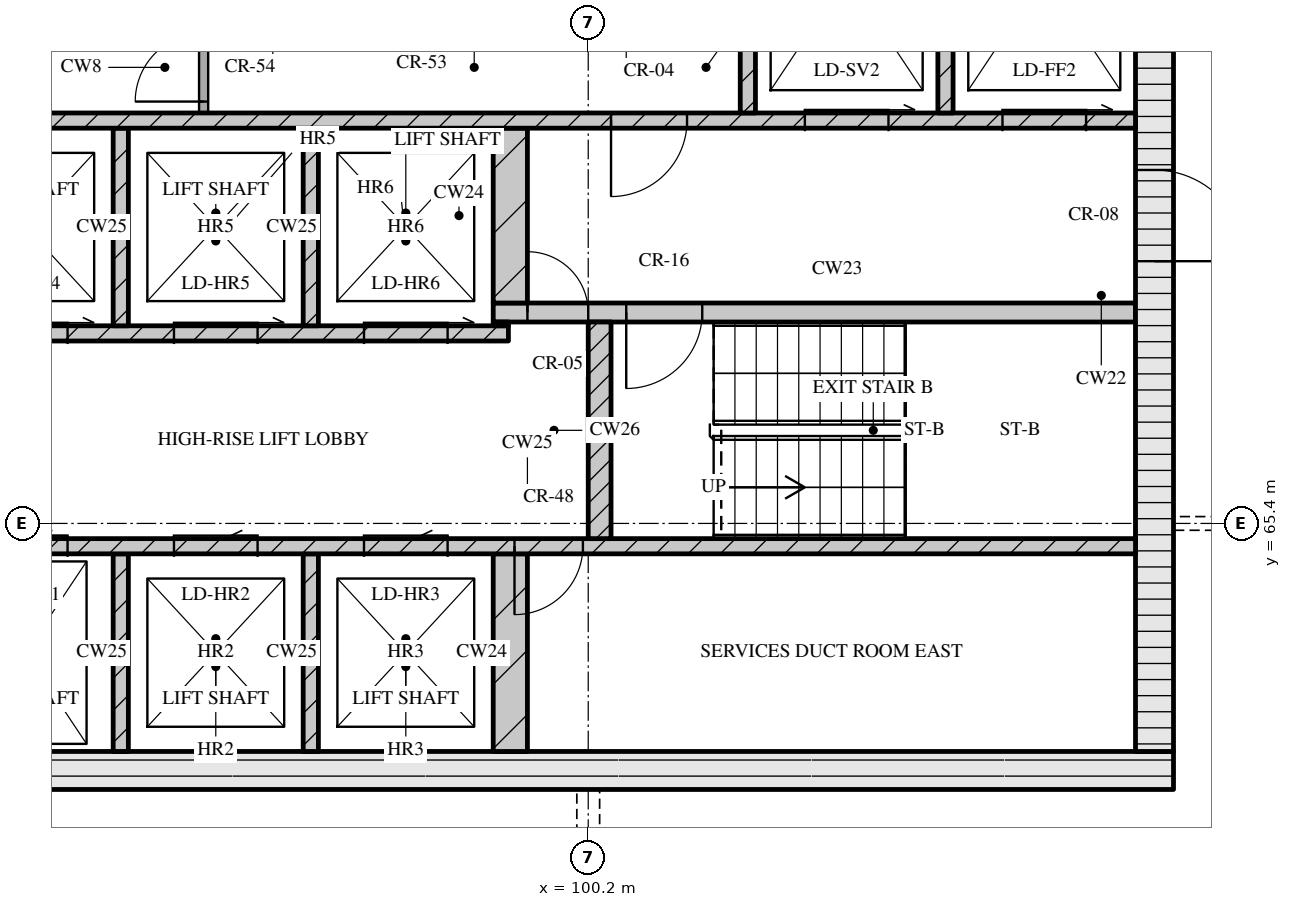
"""IFC4 building model, lengths in metres.
Left out: names, types, materials, properties, quantities, classifications, styles, units other than length and angle.
Written with IfcOpenShell. Run it as: python <this file> out.ifc"""

import sys

from ifc_helpers import new_model, si_unit, direction, frame, frame_2d, origin, place, context, subcontext, project, spatial, rectangle, extrude, element, fill, save


model = new_model("IFC4")
c1 = context("Model", 3, precision=1e-05, world=origin(), true_north=direction((0.0, 1.0)))
c2 = subcontext(c1, "Body", "Model", "MODEL_VIEW")
j1 = project(units=[si_unit("LENGTHUNIT", "METRE"), si_unit("PLANEANGLEUNIT", "RADIAN")], contexts=[c1])
p1 = place(None, origin())
s1 = spatial("IfcSite", under=j1, at=p1, CompositionType="ELEMENT")
p2 = place(p1, origin())
s2 = spatial("IfcBuilding", under=s1, at=p2, CompositionType="ELEMENT")
p3 = place(p2, frame((0.0, 0.0, 274.35)))
s3 = spatial("IfcBuildingStorey", under=s2, at=p3, CompositionType="ELEMENT", Elevation=274.35)
p4 = place(p3, frame((67.3, 62.15, 0.0), z_axis=(0.0, 0.0, 1.0), x_axis=(1.0, 0.0, 0.0)))
e1 = element("IfcWall", 1, at=p4, inside=s3, PredefinedType="SOLIDWALL", context=c2, shape_type="SweptSolid", body=[
    extrude(rectangle(XDim=40.6, YDim=0.5, at=frame_2d((20.3, 0.0))), origin(), (0.0, 0.0, 1.0), 3.32),
])
p5 = place(p4, frame((20.65, 0.0, 0.0)))
e2 = element("IfcOpeningElement", 2, at=p5, cuts=e1, PredefinedType="OPENING", context=c2, shape_type="SweptSolid", body=[
    extrude(rectangle(XDim=1.8, YDim=2.1, at=frame_2d((0.9, 1.05))), frame((0.0, 0.26, 0.0), z_axis=(0.0, -1.0, 0.0), x_axis=(1.0, 0.0, 0.0)), (0.0, 0.0, 1.0), 0.52),
])
p6 = place(p3, frame((107.65, 62.4, 0.0), z_axis=(0.0, 0.0, 1.0), x_axis=(0.0, 1.0, 0.0)))
e3 = element("IfcWall", 3, at=p6, inside=s3, PredefinedType="SOLIDWALL", context=c2, shape_type="SweptSolid", body=[
    extrude(rectangle(XDim=12.0, YDim=0.5, at=frame_2d((6.0, 0.0))), origin(), (0.0, 0.0, 1.0), 3.32),
])
p7 = place(p6, frame((6.45, 0.0, 0.0)))
e4 = element("IfcOpeningElement", 4, at=p7, cuts=e3, PredefinedType="OPENING", context=c2, shape_type="SweptSolid", body=[
    extrude(rectangle(XDim=1.2, YDim=2.1, at=frame_2d((0.6, 1.05))), frame((0.0, 0.26, 0.0), z_axis=(0.0, -1.0, 0.0), x_axis=(1.0, 0.0, 0.0)), (0.0, 0.0, 1.0), 0.52),
])
for number, where, z_axis, x_axis in (
    (5, (94.05, 62.4, 0.0), (0.0, 0.0, 1.0), (0.0, 1.0, 0.0)),
    (6, (96.55, 62.4, 0.0), (0.0, 0.0, 1.0), (0.0, 1.0, 0.0)),
):
    element("IfcWall", number, at=place(p3, frame(where, z_axis=z_axis, x_axis=x_axis)), inside=s3, PredefinedType="SOLIDWALL", context=c2, shape_type="SweptSolid", body=[
        extrude(rectangle(XDim=2.6, YDim=0.2, at=frame_2d((1.3, 0.0))), origin(), (0.0, 0.0, 1.0), 3.32),
    ])
p8 = place(p3, frame((99.175, 62.4, 0.0), z_axis=(0.0, 0.0, 1.0), x_axis=(0.0, 1.0, 0.0)))
e7 = element("IfcWall", 7, at=p8, inside=s3, PredefinedType="SOLIDWALL", context=c2, shape_type="SweptSolid", body=[
    extrude(rectangle(XDim=2.6, YDim=0.45, at=frame_2d((1.3, 0.0))), origin(), (0.0, 0.0, 1.0), 3.32),
])
p9 = place(p3, frame((91.4, 65.1, 0.0), z_axis=(0.0, 0.0, 1.0), x_axis=(1.0, 0.0, 0.0)))
e8 = element("IfcWall", 8, at=p9, inside=s3, PredefinedType="SOLIDWALL", context=c2, shape_type="SweptSolid", body=[
    extrude(rectangle(XDim=16.0, YDim=0.2, at=frame_2d((8.0, 0.0))), origin(), (0.0, 0.0, 1.0), 3.32),
])
p10 = place(p9, frame((0.85, 0.0, 0.0)))
e9 = element("IfcOpeningElement", 9, at=p10, cuts=e8, PredefinedType="OPENING", context=c2, shape_type="SweptSolid", body=[
    extrude(rectangle(XDim=1.1, YDim=2.1, at=frame_2d((0.55, 1.05))), frame((0.0, 0.11, 0.0), z_axis=(0.0, -1.0, 0.0), x_axis=(1.0, 0.0, 0.0)), (0.0, 0.0, 1.0), 0.22),
])
p11 = place(p9, frame((3.35, 0.0, 0.0)))
e10 = element("IfcOpeningElement", 10, at=p11, cuts=e8, PredefinedType="OPENING", context=c2, shape_type="SweptSolid", body=[
    extrude(rectangle(XDim=1.1, YDim=2.1, at=frame_2d((0.55, 1.05))), frame((0.0, 0.11, 0.0), z_axis=(0.0, -1.0, 0.0), x_axis=(1.0, 0.0, 0.0)), (0.0, 0.0, 1.0), 0.22),
])
p12 = place(p9, frame((5.85, 0.0, 0.0)))
e11 = element("IfcOpeningElement", 11, at=p12, cuts=e8, PredefinedType="OPENING", context=c2, shape_type="SweptSolid", body=[
    extrude(rectangle(XDim=1.1, YDim=2.1, at=frame_2d((0.55, 1.05))), frame((0.0, 0.11, 0.0), z_axis=(0.0, -1.0, 0.0), x_axis=(1.0, 0.0, 0.0)), (0.0, 0.0, 1.0), 0.22),
])
p13 = place(p9, frame((7.83, 0.0, 0.0)))
e12 = element("IfcOpeningElement", 12, at=p13, cuts=e8, PredefinedType="OPENING", context=c2, shape_type="SweptSolid", body=[
    extrude(rectangle(XDim=0.9, YDim=2.1, at=frame_2d((0.45, 1.05))), frame((0.0, 0.11, 0.0), z_axis=(0.0, -1.0, 0.0), x_axis=(1.0, 0.0, 0.0)), (0.0, 0.0, 1.0), 0.22),
])
p14 = place(p3, frame((100.35, 65.2, 0.0), z_axis=(0.0, 0.0, 1.0), x_axis=(0.0, 1.0, 0.0)))
e13 = element("IfcWall", 13, at=p14, inside=s3, PredefinedType="SOLIDWALL", context=c2, shape_type="SweptSolid", body=[
    extrude(rectangle(XDim=2.85, YDim=0.3, at=frame_2d((1.425, 0.0))), origin(), (0.0, 0.0, 1.0), 3.32),
])
p15 = place(p3, frame((76.05, 67.9, 0.0), z_axis=(0.0, 0.0, 1.0), x_axis=(1.0, 0.0, 0.0)))
e14 = element("IfcWall", 14, at=p15, inside=s3, PredefinedType="SOLIDWALL", context=c2, shape_type="SweptSolid", body=[
    extrude(rectangle(XDim=23.1, YDim=0.2, at=frame_2d((11.55, 0.0))), origin(), (0.0, 0.0, 1.0), 3.32),
])
p16 = place(p15, frame((1.35, 0.0, 0.0)))
e15 = element("IfcOpeningElement", 15, at=p16, cuts=e14, PredefinedType="OPENING", context=c2, shape_type="SweptSolid", body=[
    extrude(rectangle(XDim=0.9, YDim=2.1, at=frame_2d((0.45, 1.05))), frame((0.0, 0.11, 0.0), z_axis=(0.0, -1.0, 0.0), x_axis=(1.0, 0.0, 0.0)), (0.0, 0.0, 1.0), 0.22),
])
p17 = place(p15, frame((5.06, 0.0, 0.0)))
e16 = element("IfcOpeningElement", 16, at=p17, cuts=e14, PredefinedType="OPENING", context=c2, shape_type="SweptSolid", body=[
    extrude(rectangle(XDim=0.9, YDim=2.1, at=frame_2d((0.45, 1.05))), frame((0.0, 0.11, 0.0), z_axis=(0.0, -1.0, 0.0), x_axis=(1.0, 0.0, 0.0)), (0.0, 0.0, 1.0), 0.22),
])
p18 = place(p15, frame((8.45, 0.0, 0.0)))
e17 = element("IfcOpeningElement", 17, at=p18, cuts=e14, PredefinedType="OPENING", context=c2, shape_type="SweptSolid", body=[
    extrude(rectangle(XDim=0.9, YDim=2.1, at=frame_2d((0.45, 1.05))), frame((0.0, 0.11, 0.0), z_axis=(0.0, -1.0, 0.0), x_axis=(1.0, 0.0, 0.0)), (0.0, 0.0, 1.0), 0.22),
])
p19 = place(p15, frame((10.91, 0.0, 0.0)))
e18 = element("IfcOpeningElement", 18, at=p19, cuts=e14, PredefinedType="OPENING", context=c2, shape_type="SweptSolid", body=[
    extrude(rectangle(XDim=0.9, YDim=2.1, at=frame_2d((0.45, 1.05))), frame((0.0, 0.11, 0.0), z_axis=(0.0, -1.0, 0.0), x_axis=(1.0, 0.0, 0.0)), (0.0, 0.0, 1.0), 0.22),
])
p20 = place(p15, frame((13.55, 0.0, 0.0)))
e19 = element("IfcOpeningElement", 19, at=p20, cuts=e14, PredefinedType="OPENING", context=c2, shape_type="SweptSolid", body=[
    extrude(rectangle(XDim=1.0, YDim=2.1, at=frame_2d((0.5, 1.05))), frame((0.0, 0.11, 0.0), z_axis=(0.0, -1.0, 0.0), x_axis=(1.0, 0.0, 0.0)), (0.0, 0.0, 1.0), 0.22),
])
p21 = place(p15, frame((16.2, 0.0, 0.0)))
e20 = element("IfcOpeningElement", 20, at=p21, cuts=e14, PredefinedType="OPENING", context=c2, shape_type="SweptSolid", body=[
    extrude(rectangle(XDim=1.1, YDim=2.1, at=frame_2d((0.55, 1.05))), frame((0.0, 0.11, 0.0), z_axis=(0.0, -1.0, 0.0), x_axis=(1.0, 0.0, 0.0)), (0.0, 0.0, 1.0), 0.22),
])
p22 = place(p15, frame((18.7, 0.0, 0.0)))
e21 = element("IfcOpeningElement", 21, at=p22, cuts=e14, PredefinedType="OPENING", context=c2, shape_type="SweptSolid", body=[
    extrude(rectangle(XDim=1.1, YDim=2.1, at=frame_2d((0.55, 1.05))), frame((0.0, 0.11, 0.0), z_axis=(0.0, -1.0, 0.0), x_axis=(1.0, 0.0, 0.0)), (0.0, 0.0, 1.0), 0.22),
])
p23 = place(p15, frame((21.2, 0.0, 0.0)))
e22 = element("IfcOpeningElement", 22, at=p23, cuts=e14, PredefinedType="OPENING", context=c2, shape_type="SweptSolid", body=[
    extrude(rectangle(XDim=1.1, YDim=2.1, at=frame_2d((0.55, 1.05))), frame((0.0, 0.11, 0.0), z_axis=(0.0, -1.0, 0.0), x_axis=(1.0, 0.0, 0.0)), (0.0, 0.0, 1.0), 0.22),
])
for number, where, z_axis, x_axis in (
    (23, (94.05, 68.0, 0.0), (0.0, 0.0, 1.0), (0.0, 1.0, 0.0)),
    (24, (96.55, 68.0, 0.0), (0.0, 0.0, 1.0), (0.0, 1.0, 0.0)),
):
    element("IfcWall", number, at=place(p3, frame(where, z_axis=z_axis, x_axis=x_axis)), inside=s3, PredefinedType="SOLIDWALL", context=c2, shape_type="SweptSolid", body=[
        extrude(rectangle(XDim=2.6, YDim=0.2, at=frame_2d((1.3, 0.0))), origin(), (0.0, 0.0, 1.0), 3.32),
    ])
p24 = place(p3, frame((98.95, 68.025, 0.0), z_axis=(0.0, 0.0, 1.0), x_axis=(1.0, 0.0, 0.0)))
e25 = element("IfcWall", 25, at=p24, inside=s3, PredefinedType="SOLIDWALL", context=c2, shape_type="SweptSolid", body=[
    extrude(rectangle(XDim=0.2, YDim=0.05, at=frame_2d((0.1, 0.0))), origin(), (0.0, 0.0, 1.0), 3.32),
])
p25 = place(p3, frame((98.95, 68.175, 0.0), z_axis=(0.0, 0.0, 1.0), x_axis=(1.0, 0.0, 0.0)))
e26 = element("IfcWall", 26, at=p25, inside=s3, PredefinedType="SOLIDWALL", context=c2, shape_type="SweptSolid", body=[
    extrude(rectangle(XDim=8.45, YDim=0.25, at=frame_2d((4.225, 0.0))), origin(), (0.0, 0.0, 1.0), 3.32),
])
p26 = place(p25, frame((0.45, 0.0, 0.0)))
e27 = element("IfcOpeningElement", 27, at=p26, cuts=e26, PredefinedType="OPENING", context=c2, shape_type="SweptSolid", body=[
    extrude(rectangle(XDim=0.8, YDim=2.1, at=frame_2d((0.4, 1.05))), frame((0.0, 0.135, 0.0), z_axis=(0.0, -1.0, 0.0), x_axis=(1.0, 0.0, 0.0)), (0.0, 0.0, 1.0), 0.27),
])
p27 = place(p25, frame((1.75, 0.0, 0.0)))
e28 = element("IfcOpeningElement", 28, at=p27, cuts=e26, PredefinedType="OPENING", context=c2, shape_type="SweptSolid", body=[
    extrude(rectangle(XDim=1.0, YDim=2.1, at=frame_2d((0.5, 1.05))), frame((0.0, 0.135, 0.0), z_axis=(0.0, -1.0, 0.0), x_axis=(1.0, 0.0, 0.0)), (0.0, 0.0, 1.0), 0.27),
])
p28 = place(p3, frame((99.175, 68.3, 0.0), z_axis=(0.0, 0.0, 1.0), x_axis=(0.0, 1.0, 0.0)))
e29 = element("IfcWall", 29, at=p28, inside=s3, PredefinedType="SOLIDWALL", context=c2, shape_type="SweptSolid", body=[
    extrude(rectangle(XDim=2.3, YDim=0.45, at=frame_2d((1.15, 0.0))), origin(), (0.0, 0.0, 1.0), 3.32),
])
p29 = place(p3, frame((67.8, 70.7, 0.0), z_axis=(0.0, 0.0, 1.0), x_axis=(1.0, 0.0, 0.0)))
e30 = element("IfcWall", 30, at=p29, inside=s3, PredefinedType="SOLIDWALL", context=c2, shape_type="SweptSolid", body=[
    extrude(rectangle(XDim=39.6, YDim=0.2, at=frame_2d((19.8, 0.0))), origin(), (0.0, 0.0, 1.0), 3.32),
])
p30 = place(p29, frame((0.65, 0.0, 0.0)))
e31 = element("IfcOpeningElement", 31, at=p30, cuts=e30, PredefinedType="OPENING", context=c2, shape_type="SweptSolid", body=[
    extrude(rectangle(XDim=1.1, YDim=2.1, at=frame_2d((0.55, 1.05))), frame((0.0, 0.11, 0.0), z_axis=(0.0, -1.0, 0.0), x_axis=(1.0, 0.0, 0.0)), (0.0, 0.0, 1.0), 0.22),
])
p31 = place(p29, frame((3.25, 0.0, 0.0)))
e32 = element("IfcOpeningElement", 32, at=p31, cuts=e30, PredefinedType="OPENING", context=c2, shape_type="SweptSolid", body=[
    extrude(rectangle(XDim=1.1, YDim=2.1, at=frame_2d((0.55, 1.05))), frame((0.0, 0.11, 0.0), z_axis=(0.0, -1.0, 0.0), x_axis=(1.0, 0.0, 0.0)), (0.0, 0.0, 1.0), 0.22),
])
p32 = place(p29, frame((5.9, 0.0, 0.0)))
e33 = element("IfcOpeningElement", 33, at=p32, cuts=e30, PredefinedType="OPENING", context=c2, shape_type="SweptSolid", body=[
    extrude(rectangle(XDim=1.0, YDim=2.1, at=frame_2d((0.5, 1.05))), frame((0.0, 0.11, 0.0), z_axis=(0.0, -1.0, 0.0), x_axis=(1.0, 0.0, 0.0)), (0.0, 0.0, 1.0), 0.22),
])
p33 = place(p29, frame((21.7, 0.0, 0.0)))
e34 = element("IfcOpeningElement", 34, at=p33, cuts=e30, PredefinedType="OPENING", context=c2, shape_type="SweptSolid", body=[
    extrude(rectangle(XDim=1.0, YDim=2.1, at=frame_2d((0.5, 1.05))), frame((0.0, 0.11, 0.0), z_axis=(0.0, -1.0, 0.0), x_axis=(1.0, 0.0, 0.0)), (0.0, 0.0, 1.0), 0.22),
])
p34 = place(p29, frame((32.7, 0.0, 0.0)))
e35 = element("IfcOpeningElement", 35, at=p34, cuts=e30, PredefinedType="OPENING", context=c2, shape_type="SweptSolid", body=[
    extrude(rectangle(XDim=1.0, YDim=2.1, at=frame_2d((0.5, 1.05))), frame((0.0, 0.11, 0.0), z_axis=(0.0, -1.0, 0.0), x_axis=(1.0, 0.0, 0.0)), (0.0, 0.0, 1.0), 0.22),
])
p35 = place(p29, frame((35.25, 0.0, 0.0)))
e36 = element("IfcOpeningElement", 36, at=p35, cuts=e30, PredefinedType="OPENING", context=c2, shape_type="SweptSolid", body=[
    extrude(rectangle(XDim=1.1, YDim=2.1, at=frame_2d((0.55, 1.05))), frame((0.0, 0.11, 0.0), z_axis=(0.0, -1.0, 0.0), x_axis=(1.0, 0.0, 0.0)), (0.0, 0.0, 1.0), 0.22),
])
p36 = place(p29, frame((37.85, 0.0, 0.0)))
e37 = element("IfcOpeningElement", 37, at=p36, cuts=e30, PredefinedType="OPENING", context=c2, shape_type="SweptSolid", body=[
    extrude(rectangle(XDim=1.1, YDim=2.1, at=frame_2d((0.55, 1.05))), frame((0.0, 0.11, 0.0), z_axis=(0.0, -1.0, 0.0), x_axis=(1.0, 0.0, 0.0)), (0.0, 0.0, 1.0), 0.22),
])
p37 = place(p3, frame((95.14, 70.8, 0.0), z_axis=(0.0, 0.0, 1.0), x_axis=(0.0, 1.0, 0.0)))
e38 = element("IfcWall", 38, at=p37, inside=s3, PredefinedType="PARTITIONING", context=c2, shape_type="SweptSolid", body=[
    extrude(rectangle(XDim=1.2, YDim=0.12, at=frame_2d((0.6, 0.0))), origin(), (0.0, 0.0, 1.0), 3.32),
])
p38 = place(p37, frame((0.15, 0.0, 0.0)))
e39 = element("IfcOpeningElement", 39, at=p38, cuts=e38, PredefinedType="OPENING", context=c2, shape_type="SweptSolid", body=[
    extrude(rectangle(XDim=0.9, YDim=2.1, at=frame_2d((0.45, 1.05))), frame((0.0, 0.07, 0.0), z_axis=(0.0, -1.0, 0.0), x_axis=(1.0, 0.0, 0.0)), (0.0, 0.0, 1.0), 0.14),
])
p39 = place(p3, frame((102.3, 70.8, 0.0), z_axis=(0.0, 0.0, 1.0), x_axis=(0.0, 1.0, 0.0)))
e40 = element("IfcWall", 40, at=p39, inside=s3, PredefinedType="SOLIDWALL", context=c2, shape_type="SweptSolid", body=[
    extrude(rectangle(XDim=1.2, YDim=0.2, at=frame_2d((0.6, 0.0))), origin(), (0.0, 0.0, 1.0), 3.32),
])
p40 = place(p3, frame((104.9, 70.8, 0.0), z_axis=(0.0, 0.0, 1.0), x_axis=(0.0, 1.0, 0.0)))
e41 = element("IfcWall", 41, at=p40, inside=s3, PredefinedType="SOLIDWALL", context=c2, shape_type="SweptSolid", body=[
    extrude(rectangle(XDim=3.6, YDim=0.2, at=frame_2d((1.8, 0.0))), origin(), (0.0, 0.0, 1.0), 3.32),
])
p41 = place(p10, origin())
e42 = element("IfcDoor", 42, at=p41, inside=s3, OperationType="SLIDING_TO_LEFT", PredefinedType="DOOR", context=c2, shape_type="SweptSolid", body=[
    extrude(rectangle(XDim=1.1, YDim=2.1, at=frame_2d((0.55, 1.05))), frame((0.0, 0.025, 0.0), z_axis=(0.0, -1.0, 0.0), x_axis=(1.0, 0.0, 0.0)), (0.0, 0.0, 1.0), 0.05),
])
fill(e9, e42)
p42 = place(p11, origin())
e43 = element("IfcDoor", 43, at=p42, inside=s3, OperationType="SLIDING_TO_LEFT", PredefinedType="DOOR", context=c2, shape_type="SweptSolid", body=[
    extrude(rectangle(XDim=1.1, YDim=2.1, at=frame_2d((0.55, 1.05))), frame((0.0, 0.025, 0.0), z_axis=(0.0, -1.0, 0.0), x_axis=(1.0, 0.0, 0.0)), (0.0, 0.0, 1.0), 0.05),
])
fill(e10, e43)
p43 = place(p12, origin())
e44 = element("IfcDoor", 44, at=p43, inside=s3, OperationType="SLIDING_TO_LEFT", PredefinedType="DOOR", context=c2, shape_type="SweptSolid", body=[
    extrude(rectangle(XDim=1.1, YDim=2.1, at=frame_2d((0.55, 1.05))), frame((0.0, 0.025, 0.0), z_axis=(0.0, -1.0, 0.0), x_axis=(1.0, 0.0, 0.0)), (0.0, 0.0, 1.0), 0.05),
])
fill(e11, e44)
p44 = place(p13, origin())
e45 = element("IfcDoor", 45, at=p44, inside=s3, OperationType="SINGLE_SWING_RIGHT", PredefinedType="DOOR", context=c2, shape_type="SweptSolid", body=[
    extrude(rectangle(XDim=0.9, YDim=2.1, at=frame_2d((0.45, 1.05))), frame((0.0, 0.025, 0.0), z_axis=(0.0, -1.0, 0.0), x_axis=(1.0, 0.0, 0.0)), (0.0, 0.0, 1.0), 0.05),
])
fill(e12, e45)
p45 = place(p21, origin())
e46 = element("IfcDoor", 46, at=p45, inside=s3, OperationType="SLIDING_TO_RIGHT", PredefinedType="DOOR", context=c2, shape_type="SweptSolid", body=[
    extrude(rectangle(XDim=1.1, YDim=2.1, at=frame_2d((0.55, 1.05))), frame((0.0, 0.025, 0.0), z_axis=(0.0, -1.0, 0.0), x_axis=(1.0, 0.0, 0.0)), (0.0, 0.0, 1.0), 0.05),
])
fill(e20, e46)
p46 = place(p22, origin())
e47 = element("IfcDoor", 47, at=p46, inside=s3, OperationType="SLIDING_TO_RIGHT", PredefinedType="DOOR", context=c2, shape_type="SweptSolid", body=[
    extrude(rectangle(XDim=1.1, YDim=2.1, at=frame_2d((0.55, 1.05))), frame((0.0, 0.025, 0.0), z_axis=(0.0, -1.0, 0.0), x_axis=(1.0, 0.0, 0.0)), (0.0, 0.0, 1.0), 0.05),
])
fill(e21, e47)
p47 = place(p23, origin())
e48 = element("IfcDoor", 48, at=p47, inside=s3, OperationType="SLIDING_TO_RIGHT", PredefinedType="DOOR", context=c2, shape_type="SweptSolid", body=[
    extrude(rectangle(XDim=1.1, YDim=2.1, at=frame_2d((0.55, 1.05))), frame((0.0, 0.025, 0.0), z_axis=(0.0, -1.0, 0.0), x_axis=(1.0, 0.0, 0.0)), (0.0, 0.0, 1.0), 0.05),
])
fill(e22, e48)
p48 = place(p26, origin())
e49 = element("IfcDoor", 49, at=p48, inside=s3, OperationType="SINGLE_SWING_LEFT", PredefinedType="DOOR", context=c2, shape_type="SweptSolid", body=[
    extrude(rectangle(XDim=0.8, YDim=2.1, at=frame_2d((0.4, 1.05))), frame((0.0, 0.025, 0.0), z_axis=(0.0, -1.0, 0.0), x_axis=(1.0, 0.0, 0.0)), (0.0, 0.0, 1.0), 0.05),
])
fill(e27, e49)
p49 = place(p27, origin())
e50 = element("IfcDoor", 50, at=p49, inside=s3, OperationType="SINGLE_SWING_RIGHT", PredefinedType="DOOR", context=c2, shape_type="SweptSolid", body=[
    extrude(rectangle(XDim=1.0, YDim=2.1, at=frame_2d((0.5, 1.05))), frame((0.0, 0.025, 0.0), z_axis=(0.0, -1.0, 0.0), x_axis=(1.0, 0.0, 0.0)), (0.0, 0.0, 1.0), 0.05),
])
fill(e28, e50)
p50 = place(p7, origin())
e51 = element("IfcDoor", 51, at=p50, inside=s3, OperationType="SINGLE_SWING_RIGHT", PredefinedType="DOOR", context=c2, shape_type="SweptSolid", body=[
    extrude(rectangle(XDim=1.2, YDim=2.1, at=frame_2d((0.6, 1.05))), frame((0.0, 0.025, 0.0), z_axis=(0.0, -1.0, 0.0), x_axis=(1.0, 0.0, 0.0)), (0.0, 0.0, 1.0), 0.05),
])
fill(e4, e51)
p51 = place(p34, origin())
e52 = element("IfcDoor", 52, at=p51, inside=s3, OperationType="SINGLE_SWING_RIGHT", PredefinedType="DOOR", context=c2, shape_type="SweptSolid", body=[
    extrude(rectangle(XDim=1.0, YDim=2.1, at=frame_2d((0.5, 1.05))), frame((0.0, 0.025, 0.0), z_axis=(0.0, -1.0, 0.0), x_axis=(1.0, 0.0, 0.0)), (0.0, 0.0, 1.0), 0.05),
])
fill(e35, e52)
p52 = place(p35, origin())
e53 = element("IfcDoor", 53, at=p52, inside=s3, OperationType="SLIDING_TO_RIGHT", PredefinedType="DOOR", context=c2, shape_type="SweptSolid", body=[
    extrude(rectangle(XDim=1.1, YDim=2.1, at=frame_2d((0.55, 1.05))), frame((0.0, 0.025, 0.0), z_axis=(0.0, -1.0, 0.0), x_axis=(1.0, 0.0, 0.0)), (0.0, 0.0, 1.0), 0.05),
])
fill(e36, e53)
p53 = place(p36, origin())
e54 = element("IfcDoor", 54, at=p53, inside=s3, OperationType="SLIDING_TO_RIGHT", PredefinedType="DOOR", context=c2, shape_type="SweptSolid", body=[
    extrude(rectangle(XDim=1.1, YDim=2.1, at=frame_2d((0.55, 1.05))), frame((0.0, 0.025, 0.0), z_axis=(0.0, -1.0, 0.0), x_axis=(1.0, 0.0, 0.0)), (0.0, 0.0, 1.0), 0.05),
])
fill(e37, e54)
p54 = place(p38, origin())
e55 = element("IfcDoor", 55, at=p54, inside=s3, OperationType="SINGLE_SWING_LEFT", PredefinedType="DOOR", context=c2, shape_type="SweptSolid", body=[
    extrude(rectangle(XDim=0.9, YDim=2.1, at=frame_2d((0.45, 1.05))), frame((0.0, 0.025, 0.0), z_axis=(0.0, -1.0, 0.0), x_axis=(1.0, 0.0, 0.0)), (0.0, 0.0, 1.0), 0.05),
])
fill(e39, e55)
save(model, sys.argv[1])
